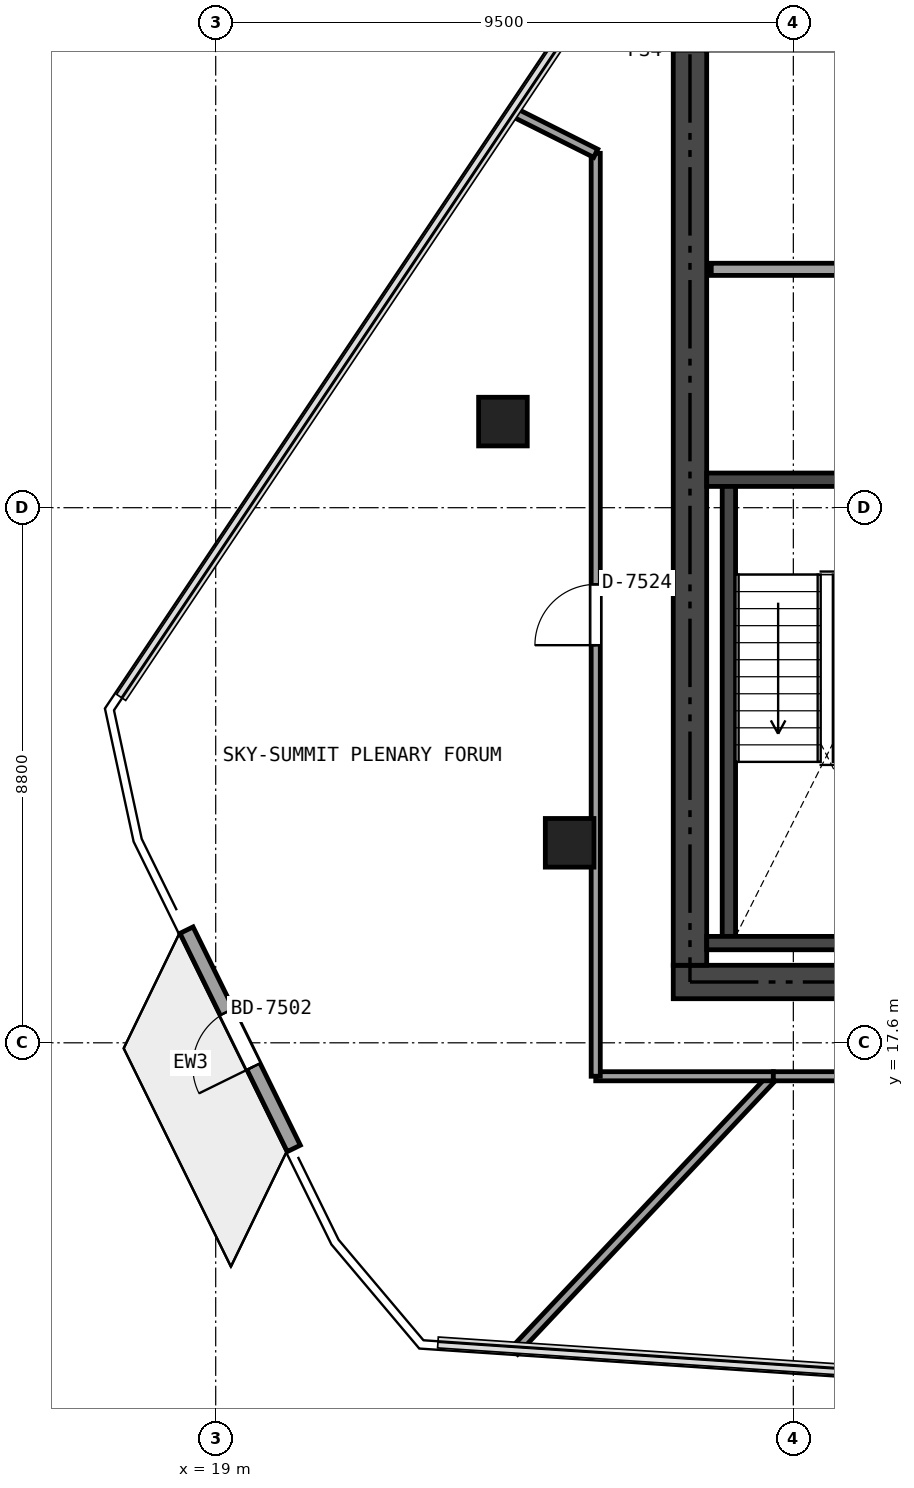
"""IFC4 building model, lengths in metres.
Left out: names, types, materials, properties, quantities, classifications, styles, units other than length and angle.
Written with IfcOpenShell. Run it as: python <this file> out.ifc"""

import sys

from ifc_helpers import new_model, si_unit, direction, frame, frame_2d, origin, origin_2d, place, context, subcontext, project, spatial, rectangle, extrude, element, fill, save


model = new_model("IFC4")
c1 = context("Model", 3, precision=1e-05, world=origin(), true_north=direction((0.0, 1.0)))
c2 = subcontext(c1, "Body", "Model", "MODEL_VIEW")
j1 = project(units=[si_unit("LENGTHUNIT", "METRE"), si_unit("PLANEANGLEUNIT", "RADIAN")], contexts=[c1])
p1 = place(None, origin())
s1 = spatial("IfcSite", under=j1, at=p1, CompositionType="ELEMENT")
p2 = place(p1, origin())
s2 = spatial("IfcBuilding", under=s1, at=p2, CompositionType="ELEMENT")
p3 = place(p2, frame((0.0, 0.0, 279.3)))
s3 = spatial("IfcBuildingStorey", under=s2, at=p3, CompositionType="ELEMENT", Elevation=279.3)
p4 = place(p3, frame((26.525, 18.6, 0.0), z_axis=(0.0, 0.0, 1.0), x_axis=(1.0, 0.0, 0.0)))
e1 = element("IfcWall", 1, at=p4, inside=s3, PredefinedType="SHEAR", context=c2, shape_type="SweptSolid", body=[
    extrude(rectangle(XDim=21.35, YDim=0.55, at=frame_2d((10.675, 0.0))), origin(), (0.0, 0.0, 1.0), 3.84),
])
p5 = place(p4, frame((12.4, 0.0, 0.0)))
e2 = element("IfcOpeningElement", 2, at=p5, cuts=e1, PredefinedType="OPENING", context=c2, shape_type="SweptSolid", body=[
    extrude(rectangle(XDim=1.15, YDim=2.15, at=frame_2d((0.575, 1.075))), frame((0.0, 0.285, 0.0), z_axis=(0.0, -1.0, 0.0), x_axis=(1.0, 0.0, 0.0)), (0.0, 0.0, 1.0), 0.57),
])
p6 = place(p4, frame((5.225, 0.0, 0.0)))
e3 = element("IfcOpeningElement", 3, at=p6, cuts=e1, PredefinedType="OPENING", context=c2, shape_type="SweptSolid", body=[
    extrude(rectangle(XDim=0.9, YDim=2.1, at=frame_2d((0.45, 1.05))), frame((0.0, 0.285, 0.0), z_axis=(0.0, -1.0, 0.0), x_axis=(1.0, 0.0, 0.0)), (0.0, 0.0, 1.0), 0.57),
])
p7 = place(p3, frame((26.8, 18.875, 0.0), z_axis=(0.0, 0.0, 1.0), x_axis=(0.0, 1.0, 0.0)))
e4 = element("IfcWall", 4, at=p7, inside=s3, PredefinedType="SHEAR", context=c2, shape_type="SweptSolid", body=[
    extrude(rectangle(XDim=15.05, YDim=0.55, at=frame_2d((7.525, 0.0))), origin(), (0.0, 0.0, 1.0), 3.84),
])
p8 = place(p3, frame((27.075, 26.86, 0.0), z_axis=(0.0, 0.0, 1.0), x_axis=(1.0, 0.0, 0.0)))
e5 = element("IfcWall", 5, at=p8, inside=s3, PredefinedType="SHEAR", context=c2, shape_type="SweptSolid", body=[
    extrude(rectangle(XDim=3.475, YDim=0.22, at=frame_2d((1.738, 0.0))), origin(), (0.0, 0.0, 1.0), 3.84),
])
p9 = place(p3, frame((27.44, 19.35, 0.0), z_axis=(0.0, 0.0, 1.0), x_axis=(0.0, 1.0, 0.0)))
e6 = element("IfcWall", 6, at=p9, inside=s3, PredefinedType="SHEAR", context=c2, shape_type="SweptSolid", body=[
    extrude(rectangle(XDim=7.4, YDim=0.22, at=frame_2d((3.7, 0.0))), origin(), (0.0, 0.0, 1.0), 3.84),
])
p10 = place(p3, frame((27.075, 19.24, 0.0), z_axis=(0.0, 0.0, 1.0), x_axis=(1.0, 0.0, 0.0)))
e7 = element("IfcWall", 7, at=p10, inside=s3, PredefinedType="SHEAR", context=c2, shape_type="SweptSolid", body=[
    extrude(rectangle(XDim=3.475, YDim=0.22, at=frame_2d((1.738, 0.0))), origin(), (0.0, 0.0, 1.0), 3.84),
])
for number, where, z_axis, x_axis in (
    (8, (23.724, 27.816, 0.0), (0.0, 0.0, 1.0), (1.0, 0.0, 0.0)),
    (9, (24.821, 20.889, 0.0), (0.0, 0.0, 1.0), (1.0, 0.0, 0.0)),
):
    element("IfcColumn", number, at=place(p3, frame(where, z_axis=z_axis, x_axis=x_axis)), inside=s3, PredefinedType="COLUMN", context=c2, shape_type="SweptSolid", body=[
        extrude(rectangle(XDim=0.8, YDim=0.8, at=origin_2d()), origin(), (0.0, 0.0, 1.0), 3.84),
    ])
p11 = place(p3, frame((20.284, 15.863, 0.0), z_axis=(0.0, 0.0, 1.0), x_axis=(-0.441001359664, 0.897506434949, 0.0)))
e10 = element("IfcWall", 10, at=p11, inside=s3, PredefinedType="SOLIDWALL", context=c2, shape_type="SweptSolid", body=[
    extrude(rectangle(XDim=4.0, YDim=0.24, at=frame_2d((2.0, 0.0))), origin(), (0.0, 0.0, 1.0), 3.84),
])
p12 = place(p11, frame((1.5, 0.0, 0.0)))
e11 = element("IfcOpeningElement", 11, at=p12, cuts=e10, PredefinedType="OPENING", context=c2, shape_type="SweptSolid", body=[
    extrude(rectangle(XDim=1.0, YDim=2.15, at=frame_2d((0.5, 1.075))), frame((0.0, 0.13, 0.0), z_axis=(0.0, -1.0, 0.0), x_axis=(1.0, 0.0, 0.0)), (0.0, 0.0, 1.0), 0.26),
])
p13 = place(p3, frame((27.15, 30.32, 0.0), z_axis=(0.0, 0.0, 1.0), x_axis=(1.0, 0.0, 0.0)))
e12 = element("IfcWall", 12, at=p13, inside=s3, PredefinedType="SOLIDWALL", context=c2, shape_type="SweptSolid", body=[
    extrude(rectangle(XDim=3.45, YDim=0.2, at=frame_2d((1.725, 0.0))), origin(), (0.0, 0.0, 1.0), 3.513),
])
p14 = place(p3, frame((23.911, 12.529, 0.0), z_axis=(0.0, 0.0, 1.0), x_axis=(0.685787534891, 0.727801797874, 0.0)))
e13 = element("IfcWall", 13, at=p14, inside=s3, PredefinedType="PARTITIONING", context=c2, shape_type="SweptSolid", body=[
    extrude(rectangle(XDim=6.212, YDim=0.15, at=frame_2d((3.106, 0.0))), origin(), (0.0, 0.0, 1.0), 3.84),
])
p15 = place(p3, frame((28.171, 17.05, 0.0), z_axis=(0.0, 0.0, 1.0), x_axis=(-1.0, 0.0, 0.0)))
e14 = element("IfcWall", 14, at=p15, inside=s3, PredefinedType="PARTITIONING", context=c2, shape_type="SweptSolid", body=[
    extrude(rectangle(XDim=2.921, YDim=0.15, at=frame_2d((1.46, 0.0))), origin(), (0.0, 0.0, 1.0), 3.84),
])
p16 = place(p3, frame((25.25, 17.05, 0.0), z_axis=(0.0, 0.0, 1.0), x_axis=(0.0, 1.0, 0.0)))
e15 = element("IfcWall", 15, at=p16, inside=s3, PredefinedType="PARTITIONING", context=c2, shape_type="SweptSolid", body=[
    extrude(rectangle(XDim=15.178, YDim=0.15, at=frame_2d((7.589, 0.0))), origin(), (0.0, 0.0, 1.0), 3.289),
])
p17 = place(p16, frame((7.089, 0.0, 0.0)))
e16 = element("IfcOpeningElement", 16, at=p17, cuts=e15, PredefinedType="OPENING", context=c2, shape_type="SweptSolid", body=[
    extrude(rectangle(XDim=1.0, YDim=2.15, at=frame_2d((0.5, 1.075))), frame((0.0, 0.085, 0.0), z_axis=(0.0, -1.0, 0.0), x_axis=(1.0, 0.0, 0.0)), (0.0, 0.0, 1.0), 0.17),
])
p18 = place(p3, frame((25.25, 32.228, 0.0), z_axis=(0.0, 0.0, 1.0), x_axis=(-0.894018231415, 0.448030581431, 0.0)))
e17 = element("IfcWall", 17, at=p18, inside=s3, PredefinedType="PARTITIONING", context=c2, shape_type="SweptSolid", body=[
    extrude(rectangle(XDim=1.553, YDim=0.15, at=frame_2d((0.777, 0.0))), origin(), (0.0, 0.0, 1.0), 3.84),
])
p19 = place(p3, frame((42.171, 17.05, 0.0), z_axis=(0.0, 0.0, 1.0), x_axis=(-1.0, 0.0, 0.0)))
e18 = element("IfcWall", 18, at=p19, inside=s3, PredefinedType="PARTITIONING", context=c2, shape_type="SweptSolid", body=[
    extrude(rectangle(XDim=14.0, YDim=0.15, at=frame_2d((7.0, 0.0))), origin(), (0.0, 0.0, 1.0), 3.289),
])
p20 = place(p19, frame((6.5, 0.0, 0.0)))
e19 = element("IfcOpeningElement", 19, at=p20, cuts=e18, PredefinedType="OPENING", context=c2, shape_type="SweptSolid", body=[
    extrude(rectangle(XDim=1.0, YDim=2.15, at=frame_2d((0.5, 1.075))), frame((0.0, 0.085, 0.0), z_axis=(0.0, -1.0, 0.0), x_axis=(1.0, 0.0, 0.0)), (0.0, 0.0, 1.0), 0.17),
])
p21 = place(p12, origin())
e20 = element("IfcDoor", 20, at=p21, inside=s3, OperationType="SINGLE_SWING_LEFT", PredefinedType="DOOR", context=c2, shape_type="SweptSolid", body=[
    extrude(rectangle(XDim=1.0, YDim=2.15, at=frame_2d((0.5, 1.075))), frame((0.0, 0.025, 0.0), z_axis=(0.0, -1.0, 0.0), x_axis=(1.0, 0.0, 0.0)), (0.0, 0.0, 1.0), 0.05),
])
fill(e11, e20)
p22 = place(p17, origin())
e21 = element("IfcDoor", 21, at=p22, inside=s3, OperationType="SINGLE_SWING_LEFT", PredefinedType="DOOR", context=c2, shape_type="SweptSolid", body=[
    extrude(rectangle(XDim=1.0, YDim=2.15, at=frame_2d((0.5, 1.075))), frame((0.0, 0.025, 0.0), z_axis=(0.0, -1.0, 0.0), x_axis=(1.0, 0.0, 0.0)), (0.0, 0.0, 1.0), 0.05),
])
fill(e16, e21)
save(model, sys.argv[1])
